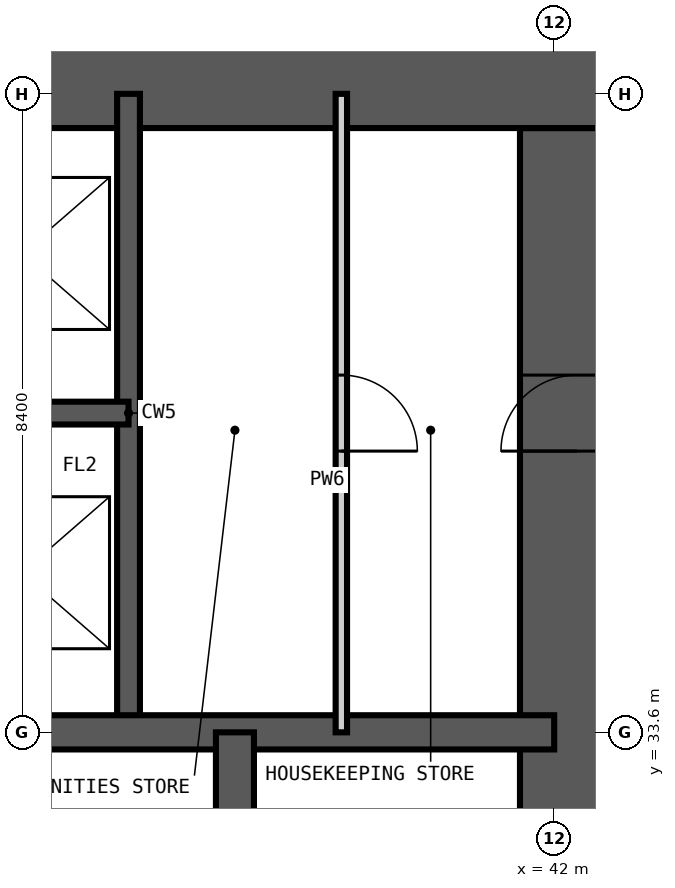
"""IFC4 building model, lengths in metres.
Left out: names, types, materials, properties, quantities, classifications, styles, units other than length and angle.
Written with IfcOpenShell. Run it as: python <this file> out.ifc"""

import sys

from ifc_helpers import new_model, si_unit, direction, frame, frame_2d, origin, place, context, subcontext, project, spatial, rectangle, extrude, element, fill, save


model = new_model("IFC4")
c1 = context("Model", 3, precision=1e-05, world=origin(), true_north=direction((0.0, 1.0)))
c2 = subcontext(c1, "Body", "Model", "MODEL_VIEW")
j1 = project(units=[si_unit("LENGTHUNIT", "METRE"), si_unit("PLANEANGLEUNIT", "RADIAN")], contexts=[c1])
p1 = place(None, origin())
s1 = spatial("IfcSite", under=j1, at=p1, CompositionType="ELEMENT")
p2 = place(p1, origin())
s2 = spatial("IfcBuilding", under=s1, at=p2, CompositionType="ELEMENT")
p3 = place(p2, frame((0.0, 0.0, 70.2)))
s3 = spatial("IfcBuildingStorey", under=s2, at=p3, CompositionType="ELEMENT", Elevation=70.2)
p4 = place(p3, frame((42.3, 17.25, -0.35), z_axis=(0.0, 0.0, 1.0), x_axis=(0.0, 1.0, 0.0)))
e1 = element("IfcWall", 1, at=p4, inside=s3, PredefinedType="SHEAR", context=c2, shape_type="SweptSolid", body=[
    extrude(rectangle(XDim=24.3, YDim=1.5, at=frame_2d((12.15, 0.0))), origin(), (0.0, 0.0, 1.0), 3.6),
])
p5 = place(p4, frame((0.35, 0.0, 0.35)))
e2 = element("IfcOpeningElement", 2, at=p5, cuts=e1, PredefinedType="OPENING", context=c2, shape_type="SweptSolid", body=[
    extrude(rectangle(XDim=1.2, YDim=2.2, at=frame_2d((0.6, 1.1))), frame((0.0, 0.76, 0.0), z_axis=(0.0, -1.0, 0.0), x_axis=(1.0, 0.0, 0.0)), (0.0, 0.0, 1.0), 1.52),
])
p6 = place(p4, frame((11.65, 0.0, 0.35)))
e3 = element("IfcOpeningElement", 3, at=p6, cuts=e1, PredefinedType="OPENING", context=c2, shape_type="SweptSolid", body=[
    extrude(rectangle(XDim=1.0, YDim=2.1, at=frame_2d((0.5, 1.05))), frame((0.0, 0.76, 0.0), z_axis=(0.0, -1.0, 0.0), x_axis=(1.0, 0.0, 0.0)), (0.0, 0.0, 1.0), 1.52),
])
p7 = place(p4, frame((20.05, 0.0, 0.35)))
e4 = element("IfcOpeningElement", 4, at=p7, cuts=e1, PredefinedType="OPENING", context=c2, shape_type="SweptSolid", body=[
    extrude(rectangle(XDim=1.0, YDim=2.1, at=frame_2d((0.5, 1.05))), frame((0.0, 0.76, 0.0), z_axis=(0.0, -1.0, 0.0), x_axis=(1.0, 0.0, 0.0)), (0.0, 0.0, 1.0), 1.52),
])
p8 = place(p3, frame((43.05, 42.3, -0.35), z_axis=(0.0, 0.0, 1.0), x_axis=(-1.0, 0.0, 0.0)))
e5 = element("IfcWall", 5, at=p8, inside=s3, PredefinedType="SHEAR", context=c2, shape_type="SweptSolid", body=[
    extrude(rectangle(XDim=27.3, YDim=1.5, at=frame_2d((13.65, 0.0))), origin(), (0.0, 0.0, 1.0), 3.6),
])
p9 = place(p8, frame((21.55, 0.0, 0.35)))
e6 = element("IfcOpeningElement", 6, at=p9, cuts=e5, PredefinedType="OPENING", context=c2, shape_type="SweptSolid", body=[
    extrude(rectangle(XDim=1.0, YDim=2.1, at=frame_2d((0.5, 1.05))), frame((0.0, 0.76, 0.0), z_axis=(0.0, -1.0, 0.0), x_axis=(1.0, 0.0, 0.0)), (0.0, 0.0, 1.0), 1.52),
])
p10 = place(p8, frame((10.95, 0.0, 0.35)))
e7 = element("IfcOpeningElement", 7, at=p10, cuts=e5, PredefinedType="OPENING", context=c2, shape_type="SweptSolid", body=[
    extrude(rectangle(XDim=1.2, YDim=2.2, at=frame_2d((0.6, 1.1))), frame((0.0, 0.76, 0.0), z_axis=(0.0, -1.0, 0.0), x_axis=(1.0, 0.0, 0.0)), (0.0, 0.0, 1.0), 1.52),
])
p11 = place(p3, frame((36.4, 33.6, -0.35), z_axis=(0.0, 0.0, 1.0), x_axis=(0.0, 1.0, 0.0)))
e8 = element("IfcWall", 8, at=p11, inside=s3, PredefinedType="SHEAR", context=c2, shape_type="SweptSolid", body=[
    extrude(rectangle(XDim=8.4, YDim=0.3, at=frame_2d((4.2, 0.0))), origin(), (0.0, 0.0, 1.0), 3.6),
])
p12 = place(p3, frame((33.6, 37.8, -0.35), z_axis=(0.0, 0.0, 1.0), x_axis=(1.0, 0.0, 0.0)))
e9 = element("IfcWall", 9, at=p12, inside=s3, PredefinedType="SHEAR", context=c2, shape_type="SweptSolid", body=[
    extrude(rectangle(XDim=2.8, YDim=0.3, at=frame_2d((1.4, 0.0))), origin(), (0.0, 0.0, 1.0), 3.6),
])
p13 = place(p3, frame((16.8, 33.6, -0.35), z_axis=(0.0, 0.0, 1.0), x_axis=(1.0, 0.0, 0.0)))
e10 = element("IfcWall", 10, at=p13, inside=s3, PredefinedType="SHEAR", context=c2, shape_type="SweptSolid", body=[
    extrude(rectangle(XDim=25.2, YDim=0.45, at=frame_2d((12.6, 0.0))), origin(), (0.0, 0.0, 1.0), 3.6),
])
p14 = place(p3, frame((37.8, 30.8, -0.35), z_axis=(0.0, 0.0, 1.0), x_axis=(0.0, 1.0, 0.0)))
e11 = element("IfcWall", 11, at=p14, inside=s3, PredefinedType="SHEAR", context=c2, shape_type="SweptSolid", body=[
    extrude(rectangle(XDim=2.8, YDim=0.5, at=frame_2d((1.4, 0.0))), origin(), (0.0, 0.0, 1.0), 3.6),
])
p15 = place(p3, frame((39.2, 33.6, 0.0), z_axis=(0.0, 0.0, 1.0), x_axis=(0.0, 1.0, 0.0)))
e12 = element("IfcWall", 12, at=p15, inside=s3, PredefinedType="PARTITIONING", context=c2, shape_type="SweptSolid", body=[
    extrude(rectangle(XDim=8.4, YDim=0.15, at=frame_2d((4.2, 0.0))), origin(), (0.0, 0.0, 1.0), 3.25),
])
p16 = place(p15, frame((3.7, 0.0, 0.0)))
e13 = element("IfcOpeningElement", 13, at=p16, cuts=e12, PredefinedType="OPENING", context=c2, shape_type="SweptSolid", body=[
    extrude(rectangle(XDim=1.0, YDim=2.1, at=frame_2d((0.5, 1.05))), frame((0.0, 0.085, 0.0), z_axis=(0.0, -1.0, 0.0), x_axis=(1.0, 0.0, 0.0)), (0.0, 0.0, 1.0), 0.17),
])
p17 = place(p7, origin())
e14 = element("IfcDoor", 14, at=p17, inside=s3, OperationType="SINGLE_SWING_LEFT", PredefinedType="DOOR", context=c2, shape_type="SweptSolid", body=[
    extrude(rectangle(XDim=1.0, YDim=2.1, at=frame_2d((0.5, 1.05))), frame((0.0, 0.025, 0.0), z_axis=(0.0, -1.0, 0.0), x_axis=(1.0, 0.0, 0.0)), (0.0, 0.0, 1.0), 0.05),
])
fill(e4, e14)
p18 = place(p16, frame((1.0, 0.0, 0.0), z_axis=(0.0, 0.0, 1.0), x_axis=(-1.0, 0.0, 0.0)))
e15 = element("IfcDoor", 15, at=p18, inside=s3, OperationType="SINGLE_SWING_RIGHT", PredefinedType="DOOR", context=c2, shape_type="SweptSolid", body=[
    extrude(rectangle(XDim=1.0, YDim=2.1, at=frame_2d((0.5, 1.05))), frame((0.0, 0.025, 0.0), z_axis=(0.0, -1.0, 0.0), x_axis=(1.0, 0.0, 0.0)), (0.0, 0.0, 1.0), 0.05),
])
fill(e13, e15)
save(model, sys.argv[1])
